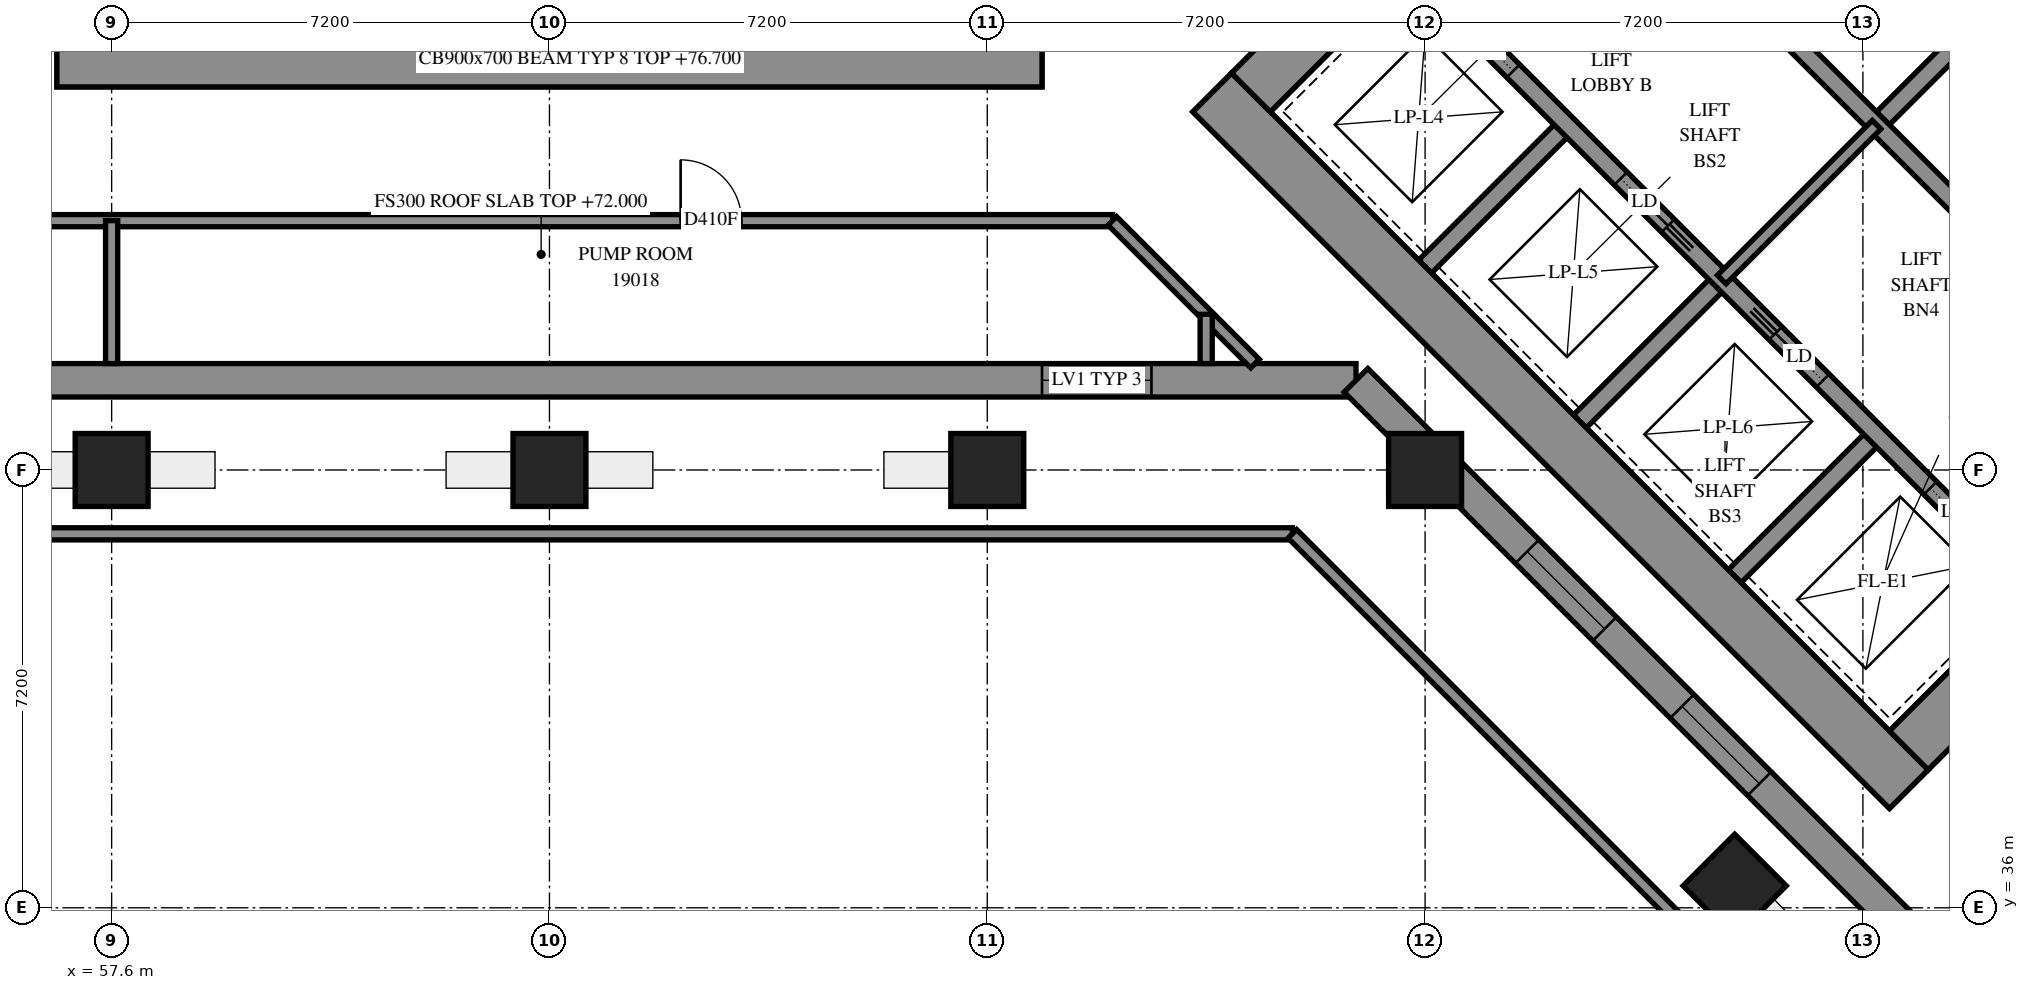
"""IFC4 building model, lengths in metres.
Left out: names, types, materials, properties, quantities, classifications, styles, units other than length and angle.
Written with IfcOpenShell. Run it as: python <this file> out.ifc"""

import sys

from ifc_helpers import new_model, si_unit, direction, frame, frame_2d, origin, origin_2d, place, context, subcontext, project, spatial, polyline, rectangle, outline, extrude, element, fill, save


model = new_model("IFC4")
c1 = context("Model", 3, precision=1e-05, world=origin(), true_north=direction((0.0, 1.0)))
c2 = subcontext(c1, "Body", "Model", "MODEL_VIEW")
j1 = project(units=[si_unit("LENGTHUNIT", "METRE"), si_unit("PLANEANGLEUNIT", "RADIAN")], contexts=[c1])
p1 = place(None, origin())
s1 = spatial("IfcSite", under=j1, at=p1, CompositionType="ELEMENT")
p2 = place(p1, origin())
s2 = spatial("IfcBuilding", under=s1, at=p2, CompositionType="ELEMENT")
p3 = place(p2, frame((0.0, 0.0, 72.0)))
s3 = spatial("IfcBuildingStorey", under=s2, at=p3, CompositionType="ELEMENT", Elevation=72.0)
for number, where, z_axis, x_axis in (
    (1, (57.6, 43.2, -0.3), (0.0, 0.0, 1.0), (1.0, 0.0, 0.0)),
    (2, (64.8, 43.2, -0.3), (0.0, 0.0, 1.0), (1.0, 0.0, 0.0)),
    (3, (72.0, 43.2, -0.3), (0.0, 0.0, 1.0), (1.0, 0.0, 0.0)),
):
    element("IfcColumn", number, at=place(p3, frame(where, z_axis=z_axis, x_axis=x_axis)), inside=s3, PredefinedType="COLUMN", context=c2, shape_type="SweptSolid", body=[
        extrude(rectangle(XDim=1.2, YDim=1.2, at=origin_2d()), origin(), (0.0, 0.0, 1.0), 5.0),
    ])
p4 = place(p3, frame((79.2, 43.2, 0.0), z_axis=(0.0, 0.0, 1.0), x_axis=(1.0, 0.0, 0.0)))
e4 = element("IfcColumn", 4, at=p4, inside=s3, PredefinedType="COLUMN", context=c2, shape_type="SweptSolid", body=[
    extrude(rectangle(XDim=1.2, YDim=1.2, at=origin_2d()), origin(), (0.0, 0.0, 1.0), 4.7),
])
p5 = place(p3, frame((84.291, 36.362, -0.3), z_axis=(0.0, 0.0, 1.0), x_axis=(0.7071067812, -0.7071067812, 0.0)))
e5 = element("IfcColumn", 5, at=p5, inside=s3, PredefinedType="COLUMN", context=c2, shape_type="SweptSolid", body=[
    extrude(rectangle(XDim=1.2, YDim=1.2, at=origin_2d()), origin(), (0.0, 0.0, 1.0), 5.0),
])
for number, where, z_axis, x_axis in (
    (6, (56.7, 49.95, -0.3), (0.0, 0.0, 1.0), (1.0, 0.0, 0.0)),
    (7, (75.7, 49.408, -0.3), (0.0, 0.0, 1.0), (0.707, -0.707, 0.0)),
):
    element("IfcWall", number, at=place(p3, frame(where, z_axis=z_axis, x_axis=x_axis)), inside=s3, PredefinedType="SHEAR", context=c2, shape_type="SweptSolid", body=[
        extrude(rectangle(XDim=16.2, YDim=0.9, at=frame_2d((8.1, 0.0))), origin(), (0.0, 0.0, 1.0), 4.3),
    ])
p6 = place(p3, frame((86.519, 60.227, -0.3), z_axis=(0.0, 0.0, 1.0), x_axis=(0.7071036948, -0.7071098676, 0.0)))
e8 = element("IfcWall", 8, at=p6, inside=s3, PredefinedType="SHEAR", context=c2, shape_type="SweptSolid", body=[
    extrude(rectangle(XDim=16.2, YDim=0.9, at=frame_2d((8.1, 0.0))), origin(), (0.0, 0.0, 1.0), 4.3),
])
p7 = place(p6, frame((10.9, 0.0, 0.3)))
e9 = element("IfcOpeningElement", 9, at=p7, cuts=e8, PredefinedType="OPENING", context=c2, shape_type="SweptSolid", body=[
    extrude(rectangle(XDim=0.8, YDim=2.1, at=frame_2d((0.4, 1.05))), frame((0.0, 0.46, 0.0), z_axis=(0.0, -1.0, 0.0), x_axis=(1.0, 0.0, 0.0)), (0.0, 0.0, 1.0), 0.92),
])
p8 = place(p3, frame((76.336, 49.408, -0.3), z_axis=(0.0, 0.0, 1.0), x_axis=(0.7071067812, 0.7071067812, 0.0)))
e10 = element("IfcWall", 10, at=p8, inside=s3, PredefinedType="SHEAR", context=c2, shape_type="SweptSolid", body=[
    extrude(rectangle(XDim=14.4, YDim=0.9, at=frame_2d((7.2, 0.0))), origin(), (0.0, 0.0, 1.0), 4.3),
])
p9 = place(p8, frame((4.55, 0.0, 0.3)))
e11 = element("IfcOpeningElement", 11, at=p9, cuts=e10, PredefinedType="OPENING", context=c2, shape_type="SweptSolid", body=[
    extrude(rectangle(XDim=1.1, YDim=2.1, at=frame_2d((0.55, 1.05))), frame((0.0, 0.46, 0.0), z_axis=(0.0, -1.0, 0.0), x_axis=(1.0, 0.0, 0.0)), (0.0, 0.0, 1.0), 0.92),
])
p10 = place(p8, frame((11.35, 0.0, 0.3)))
e12 = element("IfcOpeningElement", 12, at=p10, cuts=e10, PredefinedType="OPENING", context=c2, shape_type="SweptSolid", body=[
    extrude(rectangle(XDim=1.1, YDim=2.1, at=frame_2d((0.55, 1.05))), frame((0.0, 0.46, 0.0), z_axis=(0.0, -1.0, 0.0), x_axis=(1.0, 0.0, 0.0)), (0.0, 0.0, 1.0), 0.92),
])
p11 = place(p3, frame((87.155, 38.589, -0.3), z_axis=(0.0, 0.0, 1.0), x_axis=(0.7071067812, 0.7071067812, 0.0)))
e13 = element("IfcWall", 13, at=p11, inside=s3, PredefinedType="SHEAR", context=c2, shape_type="SweptSolid", body=[
    extrude(rectangle(XDim=14.4, YDim=0.9, at=frame_2d((7.2, 0.0))), origin(), (0.0, 0.0, 1.0), 4.3),
])
p12 = place(p11, frame((4.55, 0.0, 0.3)))
e14 = element("IfcOpeningElement", 14, at=p12, cuts=e13, PredefinedType="OPENING", context=c2, shape_type="SweptSolid", body=[
    extrude(rectangle(XDim=1.1, YDim=2.1, at=frame_2d((0.55, 1.05))), frame((0.0, 0.46, 0.0), z_axis=(0.0, -1.0, 0.0), x_axis=(1.0, 0.0, 0.0)), (0.0, 0.0, 1.0), 0.92),
])
p13 = place(p11, frame((11.35, 0.0, 0.3)))
e15 = element("IfcOpeningElement", 15, at=p13, cuts=e13, PredefinedType="OPENING", context=c2, shape_type="SweptSolid", body=[
    extrude(rectangle(XDim=1.1, YDim=2.1, at=frame_2d((0.55, 1.05))), frame((0.0, 0.46, 0.0), z_axis=(0.0, -1.0, 0.0), x_axis=(1.0, 0.0, 0.0)), (0.0, 0.0, 1.0), 0.92),
])
p14 = place(p3, frame((79.2, 46.544, 0.0), z_axis=(0.0, 0.0, 1.0), x_axis=(0.7071219326, 0.7070916295, 0.0)))
e16 = element("IfcWall", 16, at=p14, inside=s3, PredefinedType="SOLIDWALL", context=c2, shape_type="SweptSolid", body=[
    extrude(rectangle(XDim=3.3, YDim=0.3, at=frame_2d((1.65, 0.0))), origin(), (0.0, 0.0, 1.0), 4.7),
])
p15 = place(p3, frame((81.746, 43.999, 0.0), z_axis=(0.0, 0.0, 1.0), x_axis=(0.7071067812, 0.7071067812, 0.0)))
e17 = element("IfcWall", 17, at=p15, inside=s3, PredefinedType="SOLIDWALL", context=c2, shape_type="SweptSolid", body=[
    extrude(rectangle(XDim=3.3, YDim=0.3, at=frame_2d((1.65, 0.0))), origin(), (0.0, 0.0, 1.0), 4.7),
])
p16 = place(p3, frame((86.625, 48.878, 0.0), z_axis=(0.0, 0.0, 1.0), x_axis=(0.7071067812, 0.7071067812, 0.0)))
e18 = element("IfcWall", 18, at=p16, inside=s3, PredefinedType="SOLIDWALL", context=c2, shape_type="SweptSolid", body=[
    extrude(rectangle(XDim=3.3, YDim=0.3, at=frame_2d((1.65, 0.0))), origin(), (0.0, 0.0, 1.0), 4.7),
])
p17 = place(p3, frame((84.291, 41.453, 0.0), z_axis=(0.0, 0.0, 1.0), x_axis=(0.7071067812, 0.7071067812, 0.0)))
e19 = element("IfcWall", 19, at=p17, inside=s3, PredefinedType="SOLIDWALL", context=c2, shape_type="SweptSolid", body=[
    extrude(rectangle(XDim=3.3, YDim=0.3, at=frame_2d((1.65, 0.0))), origin(), (0.0, 0.0, 1.0), 4.7),
])
p18 = place(p3, frame((78.988, 51.423, 0.0), z_axis=(0.0, 0.0, 1.0), x_axis=(0.7071067812, -0.7071067812, 0.0)))
e20 = element("IfcWall", 20, at=p18, inside=s3, PredefinedType="SOLIDWALL", context=c2, shape_type="SweptSolid", body=[
    extrude(rectangle(XDim=14.4, YDim=0.3, at=frame_2d((7.2, 0.0))), origin(), (0.0, 0.0, 1.0), 4.7),
])
p19 = place(p18, frame((1.25, 0.0, 0.0)))
e21 = element("IfcOpeningElement", 21, at=p19, cuts=e20, PredefinedType="OPENING", context=c2, shape_type="SweptSolid", body=[
    extrude(rectangle(XDim=1.1, YDim=2.1, at=frame_2d((0.55, 1.05))), frame((0.0, 0.16, 0.0), z_axis=(0.0, -1.0, 0.0), x_axis=(1.0, 0.0, 0.0)), (0.0, 0.0, 1.0), 0.32),
])
p20 = place(p18, frame((4.85, 0.0, 0.0)))
e22 = element("IfcOpeningElement", 22, at=p20, cuts=e20, PredefinedType="OPENING", context=c2, shape_type="SweptSolid", body=[
    extrude(rectangle(XDim=1.1, YDim=2.1, at=frame_2d((0.55, 1.05))), frame((0.0, 0.16, 0.0), z_axis=(0.0, -1.0, 0.0), x_axis=(1.0, 0.0, 0.0)), (0.0, 0.0, 1.0), 0.32),
])
p21 = place(p18, frame((8.45, 0.0, 0.0)))
e23 = element("IfcOpeningElement", 23, at=p21, cuts=e20, PredefinedType="OPENING", context=c2, shape_type="SweptSolid", body=[
    extrude(rectangle(XDim=1.1, YDim=2.1, at=frame_2d((0.55, 1.05))), frame((0.0, 0.16, 0.0), z_axis=(0.0, -1.0, 0.0), x_axis=(1.0, 0.0, 0.0)), (0.0, 0.0, 1.0), 0.32),
])
p22 = place(p18, frame((12.05, 0.0, 0.0)))
e24 = element("IfcOpeningElement", 24, at=p22, cuts=e20, PredefinedType="OPENING", context=c2, shape_type="SweptSolid", body=[
    extrude(rectangle(XDim=1.1, YDim=2.1, at=frame_2d((0.55, 1.05))), frame((0.0, 0.16, 0.0), z_axis=(0.0, -1.0, 0.0), x_axis=(1.0, 0.0, 0.0)), (0.0, 0.0, 1.0), 0.32),
])
p23 = place(p3, frame((81.534, 53.969, 0.0), z_axis=(0.0, 0.0, 1.0), x_axis=(0.707103309, -0.7071102534, 0.0)))
e25 = element("IfcWall", 25, at=p23, inside=s3, PredefinedType="SOLIDWALL", context=c2, shape_type="SweptSolid", body=[
    extrude(rectangle(XDim=14.4, YDim=0.3, at=frame_2d((7.2, 0.0))), origin(), (0.0, 0.0, 1.0), 4.7),
])
p24 = place(p23, frame((12.05, 0.0, 0.0)))
e26 = element("IfcOpeningElement", 26, at=p24, cuts=e25, PredefinedType="OPENING", context=c2, shape_type="SweptSolid", body=[
    extrude(rectangle(XDim=1.1, YDim=2.1, at=frame_2d((0.55, 1.05))), frame((0.0, 0.16, 0.0), z_axis=(0.0, -1.0, 0.0), x_axis=(1.0, 0.0, 0.0)), (0.0, 0.0, 1.0), 0.32),
])
p25 = place(p3, frame((111.055, 38.059, 0.0), z_axis=(0.0, 0.0, 1.0), x_axis=(-0.7071078702, 0.7071056922, 0.0)))
e27 = element("IfcWall", 27, at=p25, inside=s3, PredefinedType="SOLIDWALL", context=c2, shape_type="SweptSolid", body=[
    extrude(outline(polyline([(-0.275, -0.275), (46.028, -0.275), (45.8, 0.275), (0.275, 0.275), (-0.275, -0.275)])), origin(), (0.0, 0.0, 1.0), 4.7),
])
p26 = place(p3, frame((51.875, 44.675, 0.0), z_axis=(0.0, 0.0, 1.0), x_axis=(1.0, 0.0, 0.0)))
e28 = element("IfcWall", 28, at=p26, inside=s3, PredefinedType="SOLIDWALL", context=c2, shape_type="SweptSolid", body=[
    extrude(outline(polyline([(-0.275, -0.275), (26.075, -0.275), (26.303, 0.275), (0.275, 0.275), (-0.275, -0.275)])), origin(), (0.0, 0.0, 1.0), 4.7),
])
p27 = place(p26, frame((21.025, 0.0, 0.9)))
e29 = element("IfcOpeningElement", 29, at=p27, cuts=e28, PredefinedType="OPENING", context=c2, shape_type="SweptSolid", body=[
    extrude(rectangle(XDim=1.8, YDim=2.4, at=frame_2d((0.9, 1.2))), frame((0.0, 0.285, 0.0), z_axis=(0.0, -1.0, 0.0), x_axis=(1.0, 0.0, 0.0)), (0.0, 0.0, 1.0), 0.57),
])
p28 = place(p3, frame((78.064, 44.675, 0.0), z_axis=(0.0, 0.0, 1.0), x_axis=(0.7071084256, -0.7071051368, 0.0)))
e30 = element("IfcWall", 30, at=p28, inside=s3, PredefinedType="SOLIDWALL", context=c2, shape_type="SweptSolid", body=[
    extrude(outline(polyline([(0.114, -0.275), (30.682, -0.275), (30.132, 0.275), (-0.114, 0.275), (0.114, -0.275)])), origin(), (0.0, 0.0, 1.0), 4.7),
])
p29 = place(p28, frame((3.982, 0.0, 0.9)))
e31 = element("IfcOpeningElement", 31, at=p29, cuts=e30, PredefinedType="OPENING", context=c2, shape_type="SweptSolid", body=[
    extrude(rectangle(XDim=1.8, YDim=2.4, at=frame_2d((0.9, 1.2))), frame((0.0, 0.285, 0.0), z_axis=(0.0, -1.0, 0.0), x_axis=(1.0, 0.0, 0.0)), (0.0, 0.0, 1.0), 0.57),
])
p30 = place(p28, frame((7.582, 0.0, 0.9)))
e32 = element("IfcOpeningElement", 32, at=p30, cuts=e30, PredefinedType="OPENING", context=c2, shape_type="SweptSolid", body=[
    extrude(rectangle(XDim=1.8, YDim=2.4, at=frame_2d((0.9, 1.2))), frame((0.0, 0.285, 0.0), z_axis=(0.0, -1.0, 0.0), x_axis=(1.0, 0.0, 0.0)), (0.0, 0.0, 1.0), 0.57),
])
p31 = place(p3, frame((112.929, 39.756, 0.0), z_axis=(0.0, 0.0, 1.0), x_axis=(-0.7071067812, 0.7071067812, 0.0)))
e33 = element("IfcWall", 33, at=p31, inside=s3, PredefinedType="SOLIDWALL", context=c2, shape_type="SweptSolid", body=[
    extrude(outline(polyline([(-0.1, -0.1), (47.126, -0.1), (47.044, 0.1), (0.1, 0.1), (-0.1, -0.1)])), origin(), (0.0, 0.0, 1.0), 4.7),
])
p32 = place(p3, frame((49.35, 42.15, 0.0), z_axis=(0.0, 0.0, 1.0), x_axis=(1.0, 0.0, 0.0)))
e34 = element("IfcWall", 34, at=p32, inside=s3, PredefinedType="SOLIDWALL", context=c2, shape_type="SweptSolid", body=[
    extrude(outline(polyline([(-0.1, -0.1), (27.627, -0.1), (27.709, 0.1), (0.1, 0.1), (-0.1, -0.1)])), origin(), (0.0, 0.0, 1.0), 4.7),
])
p33 = place(p3, frame((77.018, 42.15, 0.0), z_axis=(0.0, 0.0, 1.0), x_axis=(0.7071067812, -0.7071067812, 0.0)))
e35 = element("IfcWall", 35, at=p33, inside=s3, PredefinedType="SOLIDWALL", context=c2, shape_type="SweptSolid", body=[
    extrude(outline(polyline([(0.041, -0.1), (31.986, -0.1), (31.786, 0.1), (-0.041, 0.1), (0.041, -0.1)])), origin(), (0.0, 0.0, 1.0), 4.7),
])
p34 = place(p3, frame((84.079, 46.332, 0.0), z_axis=(0.0, 0.0, 1.0), x_axis=(0.7071067812, 0.7071067812, 0.0)))
e36 = element("IfcWall", 36, at=p34, inside=s3, PredefinedType="PARTITIONING", context=c2, shape_type="SweptSolid", body=[
    extrude(rectangle(XDim=3.6, YDim=0.2, at=frame_2d((1.8, 0.0))), origin(), (0.0, 0.0, 1.0), 4.7),
])
p35 = place(p3, frame((54.5, 47.3, 0.0), z_axis=(0.0, 0.0, 1.0), x_axis=(1.0, 0.0, 0.0)))
e37 = element("IfcWall", 37, at=p35, inside=s3, PredefinedType="PARTITIONING", context=c2, shape_type="SweptSolid", body=[
    extrude(rectangle(XDim=19.56, YDim=0.2, at=frame_2d((9.78, 0.0))), origin(), (0.0, 0.0, 1.0), 4.7),
])
p36 = place(p35, frame((0.243, 0.0, 0.0)))
e38 = element("IfcOpeningElement", 38, at=p36, cuts=e37, PredefinedType="OPENING", context=c2, shape_type="SweptSolid", body=[
    extrude(rectangle(XDim=1.0, YDim=2.1, at=frame_2d((0.5, 1.05))), frame((0.0, 0.11, 0.0), z_axis=(0.0, -1.0, 0.0), x_axis=(1.0, 0.0, 0.0)), (0.0, 0.0, 1.0), 0.22),
])
p37 = place(p35, frame((12.457, 0.0, 0.0)))
e39 = element("IfcOpeningElement", 39, at=p37, cuts=e37, PredefinedType="OPENING", context=c2, shape_type="SweptSolid", body=[
    extrude(rectangle(XDim=1.0, YDim=2.1, at=frame_2d((0.5, 1.05))), frame((0.0, 0.11, 0.0), z_axis=(0.0, -1.0, 0.0), x_axis=(1.0, 0.0, 0.0)), (0.0, 0.0, 1.0), 0.22),
])
p38 = place(p3, frame((87.717, 35.411, 0.0), z_axis=(0.0, 0.0, 1.0), x_axis=(0.7072325651, 0.7069809749, 0.0)))
e40 = element("IfcWall", 40, at=p38, inside=s3, PredefinedType="PARTITIONING", context=c2, shape_type="SweptSolid", body=[
    extrude(rectangle(XDim=7.949, YDim=0.2, at=frame_2d((3.975, 0.0))), origin(), (0.0, 0.0, 1.0), 4.7),
])
p39 = place(p3, frame((74.057, 47.297, 0.0), z_axis=(0.0, 0.0, 1.0), x_axis=(0.707121846, -0.707091716, 0.0)))
e41 = element("IfcWall", 41, at=p39, inside=s3, PredefinedType="PARTITIONING", context=c2, shape_type="SweptSolid", body=[
    extrude(rectangle(XDim=3.319, YDim=0.2, at=frame_2d((1.659, 0.0))), origin(), (0.0, 0.0, 1.0), 4.7),
])
p40 = place(p3, frame((57.6, 44.95, 0.0), z_axis=(0.0, 0.0, 1.0), x_axis=(0.0, 1.0, 0.0)))
e42 = element("IfcWall", 42, at=p40, inside=s3, PredefinedType="PARTITIONING", context=c2, shape_type="SweptSolid", body=[
    extrude(rectangle(XDim=2.35, YDim=0.2, at=frame_2d((1.175, 0.0))), origin(), (0.0, 0.0, 1.0), 4.7),
])
p41 = place(p3, frame((75.6, 44.95, 0.0), z_axis=(0.0, 0.0, 1.0), x_axis=(0.0, 1.0, 0.0)))
e43 = element("IfcWall", 43, at=p41, inside=s3, PredefinedType="PARTITIONING", context=c2, shape_type="SweptSolid", body=[
    extrude(rectangle(XDim=0.81, YDim=0.2, at=frame_2d((0.405, 0.0))), origin(), (0.0, 0.0, 1.0), 4.7),
])
p42 = place(p27, origin())
e44 = element("IfcWindow", 44, at=p42, inside=s3, PartitioningType="SINGLE_PANEL", PredefinedType="WINDOW", context=c2, shape_type="SweptSolid", body=[
    extrude(rectangle(XDim=1.8, YDim=2.4, at=frame_2d((0.9, 1.2))), frame((0.0, 0.155, 0.0), z_axis=(0.0, -1.0, 0.0), x_axis=(1.0, 0.0, 0.0)), (0.0, 0.0, 1.0), 0.06),
])
fill(e29, e44)
p43 = place(p29, origin())
e45 = element("IfcWindow", 45, at=p43, inside=s3, PartitioningType="SINGLE_PANEL", PredefinedType="WINDOW", context=c2, shape_type="SweptSolid", body=[
    extrude(rectangle(XDim=1.8, YDim=2.4, at=frame_2d((0.9, 1.2))), frame((0.0, 0.155, 0.0), z_axis=(0.0, -1.0, 0.0), x_axis=(1.0, 0.0, 0.0)), (0.0, 0.0, 1.0), 0.06),
])
fill(e31, e45)
p44 = place(p30, origin())
e46 = element("IfcWindow", 46, at=p44, inside=s3, PartitioningType="SINGLE_PANEL", PredefinedType="WINDOW", context=c2, shape_type="SweptSolid", body=[
    extrude(rectangle(XDim=1.8, YDim=2.4, at=frame_2d((0.9, 1.2))), frame((0.0, 0.155, 0.0), z_axis=(0.0, -1.0, 0.0), x_axis=(1.0, 0.0, 0.0)), (0.0, 0.0, 1.0), 0.06),
])
fill(e32, e46)
p45 = place(p19, origin())
e47 = element("IfcDoor", 47, at=p45, inside=s3, OperationType="SLIDING_TO_LEFT", PredefinedType="DOOR", context=c2, shape_type="SweptSolid", body=[
    extrude(rectangle(XDim=1.1, YDim=2.1, at=frame_2d((0.55, 1.05))), frame((0.0, 0.025, 0.0), z_axis=(0.0, -1.0, 0.0), x_axis=(1.0, 0.0, 0.0)), (0.0, 0.0, 1.0), 0.05),
])
fill(e21, e47)
p46 = place(p20, origin())
e48 = element("IfcDoor", 48, at=p46, inside=s3, OperationType="SLIDING_TO_RIGHT", PredefinedType="DOOR", context=c2, shape_type="SweptSolid", body=[
    extrude(rectangle(XDim=1.1, YDim=2.1, at=frame_2d((0.55, 1.05))), frame((0.0, 0.025, 0.0), z_axis=(0.0, -1.0, 0.0), x_axis=(1.0, 0.0, 0.0)), (0.0, 0.0, 1.0), 0.05),
])
fill(e22, e48)
p47 = place(p21, origin())
e49 = element("IfcDoor", 49, at=p47, inside=s3, OperationType="SLIDING_TO_LEFT", PredefinedType="DOOR", context=c2, shape_type="SweptSolid", body=[
    extrude(rectangle(XDim=1.1, YDim=2.1, at=frame_2d((0.55, 1.05))), frame((0.0, 0.025, 0.0), z_axis=(0.0, -1.0, 0.0), x_axis=(1.0, 0.0, 0.0)), (0.0, 0.0, 1.0), 0.05),
])
fill(e23, e49)
p48 = place(p22, origin())
e50 = element("IfcDoor", 50, at=p48, inside=s3, OperationType="SLIDING_TO_RIGHT", PredefinedType="DOOR", context=c2, shape_type="SweptSolid", body=[
    extrude(rectangle(XDim=1.1, YDim=2.1, at=frame_2d((0.55, 1.05))), frame((0.0, 0.025, 0.0), z_axis=(0.0, -1.0, 0.0), x_axis=(1.0, 0.0, 0.0)), (0.0, 0.0, 1.0), 0.05),
])
fill(e24, e50)
p49 = place(p37, origin())
e51 = element("IfcDoor", 51, at=p49, inside=s3, OperationType="SINGLE_SWING_LEFT", PredefinedType="DOOR", context=c2, shape_type="SweptSolid", body=[
    extrude(rectangle(XDim=1.0, YDim=2.1, at=frame_2d((0.5, 1.05))), frame((0.0, 0.025, 0.0), z_axis=(0.0, -1.0, 0.0), x_axis=(1.0, 0.0, 0.0)), (0.0, 0.0, 1.0), 0.05),
])
fill(e39, e51)
save(model, sys.argv[1])
